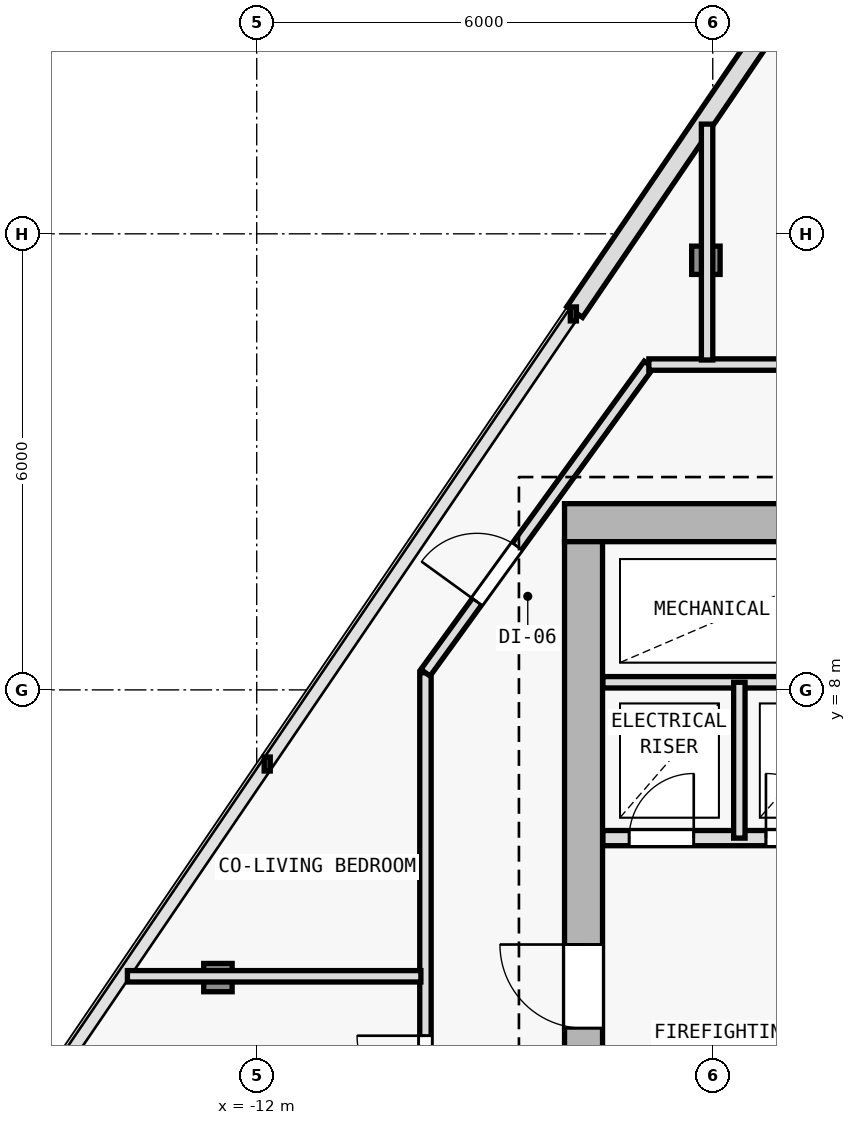
"""IFC4 building model, lengths in metres.
Left out: names, types, materials, properties, quantities, classifications, styles, units other than length and angle.
Written with IfcOpenShell. Run it as: python <this file> out.ifc"""

import sys

from ifc_helpers import new_model, si_unit, direction, frame, frame_2d, origin, origin_2d, place, context, subcontext, project, spatial, rectangle, i_section, extrude, element, fill, save


model = new_model("IFC4")
c1 = context("Model", 3, precision=1e-05, world=origin(), true_north=direction((0.0, 1.0)))
c2 = subcontext(c1, "Body", "Model", "MODEL_VIEW")
j1 = project(units=[si_unit("LENGTHUNIT", "METRE"), si_unit("PLANEANGLEUNIT", "RADIAN")], contexts=[c1])
p1 = place(None, origin())
s1 = spatial("IfcSite", under=j1, at=p1, CompositionType="ELEMENT")
p2 = place(p1, origin())
s2 = spatial("IfcBuilding", under=s1, at=p2, CompositionType="ELEMENT")
p3 = place(p2, frame((0.0, 0.0, 250.8)))
s3 = spatial("IfcBuildingStorey", under=s2, at=p3, CompositionType="ELEMENT", Elevation=250.8)
p4 = place(p3, frame((-7.7, 10.2, 0.0), z_axis=(0.0, 0.0, 1.0), x_axis=(1.0, 0.0, 0.0)))
e1 = element("IfcColumn", 1, at=p4, inside=s3, PredefinedType="COLUMN", context=c2, shape_type="SweptSolid", body=[
    extrude(i_section(OverallWidth=0.374, OverallDepth=0.372, WebThickness=0.012, FlangeThickness=0.02, FilletRadius=0.015, at=origin_2d()), origin(), (0.0, 0.0, 1.0), 3.6),
])
p5 = place(p3, frame((-6.09, 13.652, 0.005), z_axis=(0.008842562123, -0.00251672922, 0.999957736691), x_axis=(0.273743828055, 0.961802639112, 0.0)))
e2 = element("IfcColumn", 2, at=p5, inside=s3, PredefinedType="COLUMN", context=c2, shape_type="SweptSolid", body=[
    extrude(i_section(OverallWidth=0.374, OverallDepth=0.372, WebThickness=0.012, FlangeThickness=0.02, FilletRadius=0.015, at=origin_2d()), origin(), (0.0, 0.0, 1.0), 3.589),
])
p6 = place(p3, frame((-12.51, 4.215, 0.005), z_axis=(0.01700241672, 0.009521353363, 0.999810112799), x_axis=(-0.488603368932, 0.87250601595, 0.0)))
e3 = element("IfcColumn", 3, at=p6, inside=s3, PredefinedType="COLUMN", context=c2, shape_type="SweptSolid", body=[
    extrude(i_section(OverallWidth=0.374, OverallDepth=0.372, WebThickness=0.012, FlangeThickness=0.02, FilletRadius=0.015, at=origin_2d()), origin(), (0.0, 0.0, 1.0), 3.59),
])
p7 = place(p3, frame((-7.817, 12.971, 0.0), z_axis=(0.0, 0.0, 1.0), x_axis=(0.562474530687, 0.826814611826, 0.0)))
e4 = element("IfcWall", 4, at=p7, inside=s3, PredefinedType="SOLIDWALL", context=c2, shape_type="SweptSolid", body=[
    extrude(rectangle(XDim=10.107, YDim=0.25, at=frame_2d((5.053, 0.0))), origin(), (0.0, 0.0, 1.0), 3.35),
])
p8 = place(p7, frame((4.503, 0.0, 0.62)))
e5 = element("IfcOpeningElement", 5, at=p8, cuts=e4, PredefinedType="OPENING", context=c2, shape_type="SweptSolid", body=[
    extrude(rectangle(XDim=1.1, YDim=1.8, at=frame_2d((0.55, 0.9))), frame((0.0, 0.135, 0.0), z_axis=(0.0, -1.0, 0.0), x_axis=(1.0, 0.0, 0.0)), (0.0, 0.0, 1.0), 0.27),
])
p9 = place(p3, frame((7.95, 10.2, 0.0), z_axis=(0.0, 0.0, 1.0), x_axis=(-1.0, 0.0, 0.0)))
e6 = element("IfcWall", 6, at=p9, inside=s3, PredefinedType="SHEAR", context=c2, shape_type="SweptSolid", body=[
    extrude(rectangle(XDim=15.9, YDim=0.5, at=frame_2d((7.95, 0.0))), origin(), (0.0, 0.0, 1.0), 3.35),
])
p10 = place(p9, frame((4.4, 0.0, 0.0)))
e7 = element("IfcOpeningElement", 7, at=p10, cuts=e6, PredefinedType="OPENING", context=c2, shape_type="SweptSolid", body=[
    extrude(rectangle(XDim=1.1, YDim=2.15, at=frame_2d((0.55, 1.075))), frame((0.0, 0.26, 0.0), z_axis=(0.0, -1.0, 0.0), x_axis=(1.0, 0.0, 0.0)), (0.0, 0.0, 1.0), 0.52),
])
p11 = place(p3, frame((-7.7, -9.15, 0.0), z_axis=(0.0, 0.0, 1.0), x_axis=(0.0, 1.0, 0.0)))
e8 = element("IfcWall", 8, at=p11, inside=s3, PredefinedType="SHEAR", context=c2, shape_type="SweptSolid", body=[
    extrude(rectangle(XDim=19.1, YDim=0.5, at=frame_2d((9.55, 0.0))), origin(), (0.0, 0.0, 1.0), 3.35),
])
p12 = place(p11, frame((12.7, 0.0, 0.0)))
e9 = element("IfcOpeningElement", 9, at=p12, cuts=e8, PredefinedType="OPENING", context=c2, shape_type="SweptSolid", body=[
    extrude(rectangle(XDim=1.1, YDim=2.15, at=frame_2d((0.55, 1.075))), frame((0.0, 0.26, 0.0), z_axis=(0.0, -1.0, 0.0), x_axis=(1.0, 0.0, 0.0)), (0.0, 0.0, 1.0), 0.52),
])
p13 = place(p3, frame((-7.445, 6.05, 0.0), z_axis=(0.0, 0.0, 1.0), x_axis=(1.0, 0.0, 0.0)))
e10 = element("IfcWall", 10, at=p13, inside=s3, PredefinedType="SOLIDWALL", context=c2, shape_type="SweptSolid", body=[
    extrude(rectangle(XDim=3.595, YDim=0.2, at=frame_2d((1.797, 0.0))), origin(), (0.0, 0.0, 1.0), 3.35),
])
p14 = place(p13, frame((0.345, 0.0, 0.0)))
e11 = element("IfcOpeningElement", 11, at=p14, cuts=e10, PredefinedType="OPENING", context=c2, shape_type="SweptSolid", body=[
    extrude(rectangle(XDim=0.85, YDim=2.1, at=frame_2d((0.425, 1.05))), frame((0.0, 0.11, 0.0), z_axis=(0.0, -1.0, 0.0), x_axis=(1.0, 0.0, 0.0)), (0.0, 0.0, 1.0), 0.22),
])
p15 = place(p13, frame((2.145, 0.0, 0.0)))
e12 = element("IfcOpeningElement", 12, at=p15, cuts=e10, PredefinedType="OPENING", context=c2, shape_type="SweptSolid", body=[
    extrude(rectangle(XDim=0.85, YDim=2.1, at=frame_2d((0.425, 1.05))), frame((0.0, 0.11, 0.0), z_axis=(0.0, -1.0, 0.0), x_axis=(1.0, 0.0, 0.0)), (0.0, 0.0, 1.0), 0.22),
])
p16 = place(p3, frame((-7.445, 8.1, 0.0), z_axis=(0.0, 0.0, 1.0), x_axis=(1.0, 0.0, 0.0)))
e13 = element("IfcWall", 13, at=p16, inside=s3, PredefinedType="PARTITIONING", context=c2, shape_type="SweptSolid", body=[
    extrude(rectangle(XDim=3.595, YDim=0.15, at=frame_2d((1.797, 0.0))), origin(), (0.0, 0.0, 1.0), 3.35),
])
p17 = place(p3, frame((-5.65, 6.05, 0.0), z_axis=(0.0, 0.0, 1.0), x_axis=(0.0, 1.0, 0.0)))
e14 = element("IfcWall", 14, at=p17, inside=s3, PredefinedType="PARTITIONING", context=c2, shape_type="SweptSolid", body=[
    extrude(rectangle(XDim=2.05, YDim=0.15, at=frame_2d((1.025, 0.0))), origin(), (0.0, 0.0, 1.0), 3.35),
])
p18 = place(p3, frame((-9.78, -11.48, 0.0), z_axis=(0.0, 0.0, 1.0), x_axis=(0.0, 1.0, 0.0)))
e15 = element("IfcWall", 15, at=p18, inside=s3, PredefinedType="PARTITIONING", context=c2, shape_type="SweptSolid", body=[
    extrude(rectangle(XDim=19.706, YDim=0.15, at=frame_2d((9.853, 0.0))), origin(), (0.0, 0.0, 1.0), 2.875),
])
p19 = place(p18, frame((9.286, 0.0, 0.0)))
e16 = element("IfcOpeningElement", 16, at=p19, cuts=e15, PredefinedType="OPENING", context=c2, shape_type="SweptSolid", body=[
    extrude(rectangle(XDim=0.9, YDim=2.1, at=frame_2d((0.45, 1.05))), frame((0.0, 0.085, 0.0), z_axis=(0.0, -1.0, 0.0), x_axis=(1.0, 0.0, 0.0)), (0.0, 0.0, 1.0), 0.17),
])
p20 = place(p18, frame((6.969, 0.0, 0.0)))
e17 = element("IfcOpeningElement", 17, at=p20, cuts=e15, PredefinedType="OPENING", context=c2, shape_type="SweptSolid", body=[
    extrude(rectangle(XDim=0.9, YDim=2.1, at=frame_2d((0.45, 1.05))), frame((0.0, 0.085, 0.0), z_axis=(0.0, -1.0, 0.0), x_axis=(1.0, 0.0, 0.0)), (0.0, 0.0, 1.0), 0.17),
])
p21 = place(p18, frame((4.743, 0.0, 0.0)))
e18 = element("IfcOpeningElement", 18, at=p21, cuts=e15, PredefinedType="OPENING", context=c2, shape_type="SweptSolid", body=[
    extrude(rectangle(XDim=0.9, YDim=2.1, at=frame_2d((0.45, 1.05))), frame((0.0, 0.085, 0.0), z_axis=(0.0, -1.0, 0.0), x_axis=(1.0, 0.0, 0.0)), (0.0, 0.0, 1.0), 0.17),
])
p22 = place(p18, frame((3.051, 0.0, 0.0)))
e19 = element("IfcOpeningElement", 19, at=p22, cuts=e15, PredefinedType="OPENING", context=c2, shape_type="SweptSolid", body=[
    extrude(rectangle(XDim=0.85, YDim=2.1, at=frame_2d((0.425, 1.05))), frame((0.0, 0.085, 0.0), z_axis=(0.0, -1.0, 0.0), x_axis=(1.0, 0.0, 0.0)), (0.0, 0.0, 1.0), 0.17),
])
p23 = place(p18, frame((1.095, 0.0, 0.0)))
e20 = element("IfcOpeningElement", 20, at=p23, cuts=e15, PredefinedType="OPENING", context=c2, shape_type="SweptSolid", body=[
    extrude(rectangle(XDim=0.9, YDim=2.1, at=frame_2d((0.45, 1.05))), frame((0.0, 0.085, 0.0), z_axis=(0.0, -1.0, 0.0), x_axis=(1.0, 0.0, 0.0)), (0.0, 0.0, 1.0), 0.17),
])
p24 = place(p18, frame((14.03, 0.0, 0.0)))
e21 = element("IfcOpeningElement", 21, at=p24, cuts=e15, PredefinedType="OPENING", context=c2, shape_type="SweptSolid", body=[
    extrude(rectangle(XDim=0.9, YDim=2.1, at=frame_2d((0.45, 1.05))), frame((0.0, 0.085, 0.0), z_axis=(0.0, -1.0, 0.0), x_axis=(1.0, 0.0, 0.0)), (0.0, 0.0, 1.0), 0.17),
])
p25 = place(p18, frame((11.64, 0.0, 0.0)))
e22 = element("IfcOpeningElement", 22, at=p25, cuts=e15, PredefinedType="OPENING", context=c2, shape_type="SweptSolid", body=[
    extrude(rectangle(XDim=0.9, YDim=2.1, at=frame_2d((0.45, 1.05))), frame((0.0, 0.085, 0.0), z_axis=(0.0, -1.0, 0.0), x_axis=(1.0, 0.0, 0.0)), (0.0, 0.0, 1.0), 0.17),
])
p26 = place(p3, frame((-9.78, 8.226, 0.0), z_axis=(0.0, 0.0, 1.0), x_axis=(0.586956386413, 0.809618552436, 0.0)))
e23 = element("IfcWall", 23, at=p26, inside=s3, PredefinedType="PARTITIONING", context=c2, shape_type="SweptSolid", body=[
    extrude(rectangle(XDim=5.008, YDim=0.15, at=frame_2d((2.504, 0.0))), origin(), (0.0, 0.0, 1.0), 2.875),
])
p27 = place(p26, frame((1.154, 0.0, 0.0)))
e24 = element("IfcOpeningElement", 24, at=p27, cuts=e23, PredefinedType="OPENING", context=c2, shape_type="SweptSolid", body=[
    extrude(rectangle(XDim=0.9, YDim=2.1, at=frame_2d((0.45, 1.05))), frame((0.0, 0.085, 0.0), z_axis=(0.0, -1.0, 0.0), x_axis=(1.0, 0.0, 0.0)), (0.0, 0.0, 1.0), 0.17),
])
p28 = place(p3, frame((-6.841, 12.28, 0.0), z_axis=(0.0, 0.0, 1.0), x_axis=(1.0, 0.0, 0.0)))
e25 = element("IfcWall", 25, at=p28, inside=s3, PredefinedType="PARTITIONING", context=c2, shape_type="SweptSolid", body=[
    extrude(rectangle(XDim=13.682, YDim=0.15, at=frame_2d((6.841, 0.0))), origin(), (0.0, 0.0, 1.0), 3.015),
])
p29 = place(p28, frame((4.805, 0.0, 0.0)))
e26 = element("IfcOpeningElement", 26, at=p29, cuts=e25, PredefinedType="OPENING", context=c2, shape_type="SweptSolid", body=[
    extrude(rectangle(XDim=0.9, YDim=2.1, at=frame_2d((0.45, 1.05))), frame((0.0, 0.085, 0.0), z_axis=(0.0, -1.0, 0.0), x_axis=(1.0, 0.0, 0.0)), (0.0, 0.0, 1.0), 0.17),
])
p30 = place(p3, frame((-6.074, 12.34, 0.0), z_axis=(0.0, 0.0, 1.0), x_axis=(0.0, 1.0, 0.0)))
e27 = element("IfcWall", 27, at=p30, inside=s3, PredefinedType="PARTITIONING", context=c2, shape_type="SweptSolid", body=[
    extrude(rectangle(XDim=3.103, YDim=0.15, at=frame_2d((1.552, 0.0))), origin(), (0.0, 0.0, 1.0), 3.015),
])
p31 = place(p3, frame((-9.84, 4.232, 0.0), z_axis=(0.0, 0.0, 1.0), x_axis=(-1.0, 0.0, 0.0)))
e28 = element("IfcWall", 28, at=p31, inside=s3, PredefinedType="PARTITIONING", context=c2, shape_type="SweptSolid", body=[
    extrude(rectangle(XDim=3.861, YDim=0.15, at=frame_2d((1.931, 0.0))), origin(), (0.0, 0.0, 1.0), 2.875),
])
p32 = place(p12, origin())
e29 = element("IfcDoor", 29, at=p32, inside=s3, OperationType="SINGLE_SWING_RIGHT", PredefinedType="DOOR", context=c2, shape_type="SweptSolid", body=[
    extrude(rectangle(XDim=1.1, YDim=2.15, at=frame_2d((0.55, 1.075))), frame((0.0, 0.025, 0.0), z_axis=(0.0, -1.0, 0.0), x_axis=(1.0, 0.0, 0.0)), (0.0, 0.0, 1.0), 0.05),
])
fill(e9, e29)
p33 = place(p14, origin())
e30 = element("IfcDoor", 30, at=p33, inside=s3, OperationType="SINGLE_SWING_RIGHT", PredefinedType="DOOR", context=c2, shape_type="SweptSolid", body=[
    extrude(rectangle(XDim=0.85, YDim=2.1, at=frame_2d((0.425, 1.05))), frame((0.0, 0.025, 0.0), z_axis=(0.0, -1.0, 0.0), x_axis=(1.0, 0.0, 0.0)), (0.0, 0.0, 1.0), 0.05),
])
fill(e11, e30)
p34 = place(p15, origin())
e31 = element("IfcDoor", 31, at=p34, inside=s3, OperationType="SINGLE_SWING_LEFT", PredefinedType="DOOR", context=c2, shape_type="SweptSolid", body=[
    extrude(rectangle(XDim=0.85, YDim=2.1, at=frame_2d((0.425, 1.05))), frame((0.0, 0.025, 0.0), z_axis=(0.0, -1.0, 0.0), x_axis=(1.0, 0.0, 0.0)), (0.0, 0.0, 1.0), 0.05),
])
fill(e12, e31)
p35 = place(p27, origin())
e32 = element("IfcDoor", 32, at=p35, inside=s3, OperationType="SINGLE_SWING_LEFT", PredefinedType="DOOR", context=c2, shape_type="SweptSolid", body=[
    extrude(rectangle(XDim=0.9, YDim=2.1, at=frame_2d((0.45, 1.05))), frame((0.0, 0.025, 0.0), z_axis=(0.0, -1.0, 0.0), x_axis=(1.0, 0.0, 0.0)), (0.0, 0.0, 1.0), 0.05),
])
fill(e24, e32)
p36 = place(p24, origin())
e33 = element("IfcDoor", 33, at=p36, inside=s3, OperationType="SINGLE_SWING_RIGHT", PredefinedType="DOOR", context=c2, shape_type="SweptSolid", body=[
    extrude(rectangle(XDim=0.9, YDim=2.1, at=frame_2d((0.45, 1.05))), frame((0.0, 0.025, 0.0), z_axis=(0.0, -1.0, 0.0), x_axis=(1.0, 0.0, 0.0)), (0.0, 0.0, 1.0), 0.05),
])
fill(e21, e33)
save(model, sys.argv[1])
